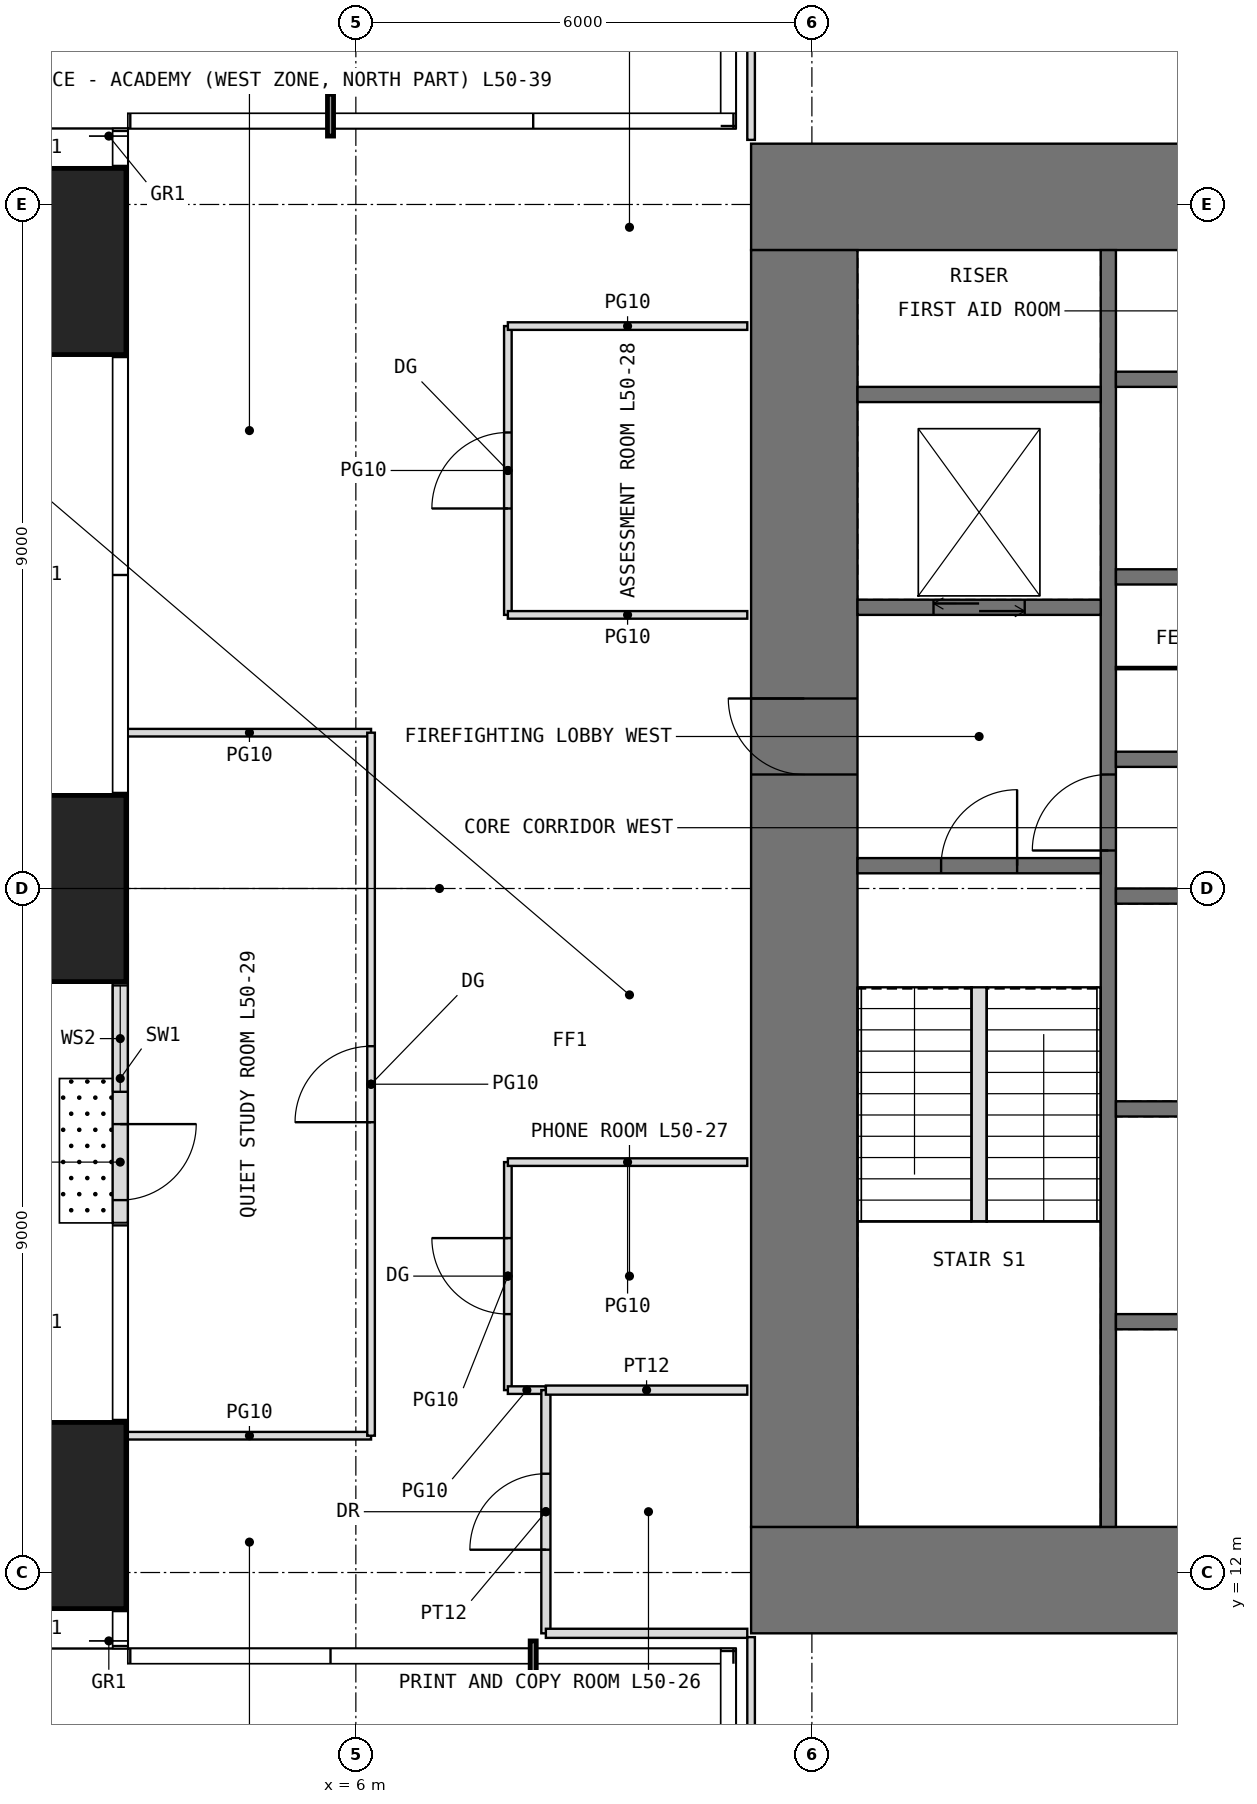
"""IFC4 building model, lengths in metres.
Left out: names, types, materials, properties, quantities, classifications, styles, units other than length and angle.
Written with IfcOpenShell. Run it as: python <this file> out.ifc"""

import sys

from ifc_helpers import new_model, si_unit, direction, frame, frame_2d, origin, origin_2d, place, context, subcontext, project, spatial, rectangle, extrude, element, fill, save


model = new_model("IFC4")
c1 = context("Model", 3, precision=1e-05, world=origin(), true_north=direction((0.0, 1.0)))
c2 = subcontext(c1, "Body", "Model", "MODEL_VIEW")
j1 = project(units=[si_unit("LENGTHUNIT", "METRE"), si_unit("PLANEANGLEUNIT", "RADIAN")], contexts=[c1])
p1 = place(None, origin())
s1 = spatial("IfcSite", under=j1, at=p1, CompositionType="ELEMENT")
p2 = place(p1, origin())
s2 = spatial("IfcBuilding", under=s1, at=p2, CompositionType="ELEMENT")
p3 = place(p2, frame((0.0, 0.0, 210.5)))
s3 = spatial("IfcBuildingStorey", under=s2, at=p3, CompositionType="ELEMENT", Elevation=210.5)
for number, where, z_axis, x_axis in (
    (1, (1.75, 12.75, 0.0), (0.0, 0.0, 1.0), (1.0, 0.0, 0.0)),
    (2, (1.75, 21.0, 0.0), (0.0, 0.0, 1.0), (1.0, 0.0, 0.0)),
    (3, (1.75, 29.25, 0.0), (0.0, 0.0, 1.0), (1.0, 0.0, 0.0)),
):
    element("IfcColumn", number, at=place(p3, frame(where, z_axis=z_axis, x_axis=x_axis)), inside=s3, PredefinedType="COLUMN", context=c2, shape_type="SweptSolid", body=[
        extrude(rectangle(XDim=2.45, YDim=2.45, at=origin_2d()), origin(), (0.0, 0.0, 1.0), 4.0),
    ])
p4 = place(p3, frame((2.9, 20.4, 0.0), z_axis=(0.0, 0.0, 1.0), x_axis=(0.0, -1.0, 0.0)))
e4 = element("IfcWall", 4, at=p4, inside=s3, PredefinedType="USERDEFINED", context=c2, shape_type="SweptSolid", body=[
    extrude(rectangle(XDim=3.8, YDim=0.2, at=frame_2d((1.9, 0.0))), origin(), (0.0, 0.0, 1.0), 3.75),
])
p5 = place(p4, frame((2.5, 0.0, 0.0)))
e5 = element("IfcOpeningElement", 5, at=p5, cuts=e4, PredefinedType="OPENING", context=c2, shape_type="SweptSolid", body=[
    extrude(rectangle(XDim=1.0, YDim=2.4, at=frame_2d((0.5, 1.2))), frame((0.0, 0.11, 0.0), z_axis=(0.0, -1.0, 0.0), x_axis=(1.0, 0.0, 0.0)), (0.0, 0.0, 1.0), 0.22),
])
p6 = place(p4, frame((0.675, 0.0, 0.3)))
e6 = element("IfcOpeningElement", 6, at=p6, cuts=e4, PredefinedType="OPENING", context=c2, shape_type="SweptSolid", body=[
    extrude(rectangle(XDim=1.4, YDim=2.7, at=frame_2d((0.7, 1.35))), frame((0.0, 0.11, 0.0), z_axis=(0.0, -1.0, 0.0), x_axis=(1.0, 0.0, 0.0)), (0.0, 0.0, 1.0), 0.22),
])
p7 = place(p3, frame((11.2, 11.9, -0.05), z_axis=(0.0, 0.0, 1.0), x_axis=(1.0, 0.0, 0.0)))
e7 = element("IfcWall", 7, at=p7, inside=s3, PredefinedType="SHEAR", context=c2, shape_type="SweptSolid", body=[
    extrude(rectangle(XDim=19.6, YDim=1.4, at=frame_2d((9.8, 0.0))), origin(), (0.0, 0.0, 1.0), 4.0),
])
p8 = place(p7, frame((8.8, 0.0, 0.05)))
e8 = element("IfcOpeningElement", 8, at=p8, cuts=e7, PredefinedType="OPENING", context=c2, shape_type="SweptSolid", body=[
    extrude(rectangle(XDim=2.0, YDim=2.2, at=frame_2d((1.0, 1.1))), frame((0.0, 0.71, 0.0), z_axis=(0.0, -1.0, 0.0), x_axis=(1.0, 0.0, 0.0)), (0.0, 0.0, 1.0), 1.42),
])
p9 = place(p3, frame((11.2, 30.1, -0.05), z_axis=(0.0, 0.0, 1.0), x_axis=(1.0, 0.0, 0.0)))
e9 = element("IfcWall", 9, at=p9, inside=s3, PredefinedType="SHEAR", context=c2, shape_type="SweptSolid", body=[
    extrude(rectangle(XDim=19.6, YDim=1.4, at=frame_2d((9.8, 0.0))), origin(), (0.0, 0.0, 1.0), 4.0),
])
p10 = place(p9, frame((8.8, 0.0, 0.05)))
e10 = element("IfcOpeningElement", 10, at=p10, cuts=e9, PredefinedType="OPENING", context=c2, shape_type="SweptSolid", body=[
    extrude(rectangle(XDim=2.0, YDim=2.2, at=frame_2d((1.0, 1.1))), frame((0.0, 0.71, 0.0), z_axis=(0.0, -1.0, 0.0), x_axis=(1.0, 0.0, 0.0)), (0.0, 0.0, 1.0), 1.42),
])
p11 = place(p3, frame((11.9, 12.6, -0.05), z_axis=(0.0, 0.0, 1.0), x_axis=(0.0, 1.0, 0.0)))
e11 = element("IfcWall", 11, at=p11, inside=s3, PredefinedType="SHEAR", context=c2, shape_type="SweptSolid", body=[
    extrude(rectangle(XDim=16.8, YDim=1.4, at=frame_2d((8.4, 0.0))), origin(), (0.0, 0.0, 1.0), 4.0),
])
p12 = place(p11, frame((9.9, 0.0, 0.05)))
e12 = element("IfcOpeningElement", 12, at=p12, cuts=e11, PredefinedType="OPENING", context=c2, shape_type="SweptSolid", body=[
    extrude(rectangle(XDim=1.0, YDim=2.2, at=frame_2d((0.5, 1.1))), frame((0.0, 0.71, 0.0), z_axis=(0.0, -1.0, 0.0), x_axis=(1.0, 0.0, 0.0)), (0.0, 0.0, 1.0), 1.42),
])
p13 = place(p3, frame((15.9, 12.6, -0.05), z_axis=(0.0, 0.0, 1.0), x_axis=(0.0, 1.0, 0.0)))
e13 = element("IfcWall", 13, at=p13, inside=s3, PredefinedType="SHEAR", context=c2, shape_type="SweptSolid", body=[
    extrude(rectangle(XDim=16.8, YDim=0.2, at=frame_2d((8.4, 0.0))), origin(), (0.0, 0.0, 1.0), 4.0),
])
p14 = place(p13, frame((8.9, 0.0, 0.05)))
e14 = element("IfcOpeningElement", 14, at=p14, cuts=e13, PredefinedType="OPENING", context=c2, shape_type="SweptSolid", body=[
    extrude(rectangle(XDim=1.0, YDim=2.2, at=frame_2d((0.5, 1.1))), frame((0.0, 0.11, 0.0), z_axis=(0.0, -1.0, 0.0), x_axis=(1.0, 0.0, 0.0)), (0.0, 0.0, 1.0), 0.22),
])
p15 = place(p3, frame((12.6, 21.3, -0.05), z_axis=(0.0, 0.0, 1.0), x_axis=(1.0, 0.0, 0.0)))
e15 = element("IfcWall", 15, at=p15, inside=s3, PredefinedType="SHEAR", context=c2, shape_type="SweptSolid", body=[
    extrude(rectangle(XDim=3.2, YDim=0.2, at=frame_2d((1.6, 0.0))), origin(), (0.0, 0.0, 1.0), 4.0),
])
p16 = place(p15, frame((1.1, 0.0, 0.05)))
e16 = element("IfcOpeningElement", 16, at=p16, cuts=e15, PredefinedType="OPENING", context=c2, shape_type="SweptSolid", body=[
    extrude(rectangle(XDim=1.0, YDim=2.2, at=frame_2d((0.5, 1.1))), frame((0.0, 0.11, 0.0), z_axis=(0.0, -1.0, 0.0), x_axis=(1.0, 0.0, 0.0)), (0.0, 0.0, 1.0), 0.22),
])
p17 = place(p3, frame((12.6, 24.7, -0.05), z_axis=(0.0, 0.0, 1.0), x_axis=(1.0, 0.0, 0.0)))
e17 = element("IfcWall", 17, at=p17, inside=s3, PredefinedType="SHEAR", context=c2, shape_type="SweptSolid", body=[
    extrude(rectangle(XDim=3.2, YDim=0.2, at=frame_2d((1.6, 0.0))), origin(), (0.0, 0.0, 1.0), 4.0),
])
p18 = place(p17, frame((1.0, 0.0, 0.05)))
e18 = element("IfcOpeningElement", 18, at=p18, cuts=e17, PredefinedType="OPENING", context=c2, shape_type="SweptSolid", body=[
    extrude(rectangle(XDim=1.2, YDim=2.2, at=frame_2d((0.6, 1.1))), frame((0.0, 0.11, 0.0), z_axis=(0.0, -1.0, 0.0), x_axis=(1.0, 0.0, 0.0)), (0.0, 0.0, 1.0), 0.22),
])
for number, where, z_axis, x_axis in (
    (19, (12.6, 27.5, -0.05), (0.0, 0.0, 1.0), (1.0, 0.0, 0.0)),
    (20, (16.0, 15.3, -0.05), (0.0, 0.0, 1.0), (1.0, 0.0, 0.0)),
    (21, (16.0, 18.1, -0.05), (0.0, 0.0, 1.0), (1.0, 0.0, 0.0)),
    (22, (16.0, 20.9, -0.05), (0.0, 0.0, 1.0), (1.0, 0.0, 0.0)),
    (23, (16.0, 22.7, -0.05), (0.0, 0.0, 1.0), (1.0, 0.0, 0.0)),
    (24, (16.0, 25.1, -0.05), (0.0, 0.0, 1.0), (1.0, 0.0, 0.0)),
    (25, (16.0, 27.7, -0.05), (0.0, 0.0, 1.0), (1.0, 0.0, 0.0)),
):
    element("IfcWall", number, at=place(p3, frame(where, z_axis=z_axis, x_axis=x_axis)), inside=s3, PredefinedType="SHEAR", context=c2, shape_type="SweptSolid", body=[
        extrude(rectangle(XDim=3.2, YDim=0.2, at=frame_2d((1.6, 0.0))), origin(), (0.0, 0.0, 1.0), 4.0),
    ])
p19 = place(p3, frame((16.0, 23.9, 0.0), z_axis=(0.0, 0.0, 1.0), x_axis=(1.0, 0.0, 0.0)))
e26 = element("IfcWall", 26, at=p19, inside=s3, PredefinedType="PARTITIONING", context=c2, shape_type="SweptSolid", body=[
    extrude(rectangle(XDim=1.4, YDim=0.03, at=frame_2d((0.7, 0.0))), origin(), (0.0, 0.0, 1.0), 3.75),
])
for number, where, z_axis, x_axis in (
    (27, (3.0, 13.8, 0.0), (0.0, 0.0, 1.0), (1.0, 0.0, 0.0)),
    (28, (3.0, 23.05, 0.0), (0.0, 0.0, 1.0), (1.0, 0.0, 0.0)),
):
    element("IfcWall", number, at=place(p3, frame(where, z_axis=z_axis, x_axis=x_axis)), inside=s3, PredefinedType="PARTITIONING", context=c2, shape_type="SweptSolid", body=[
        extrude(rectangle(XDim=3.2, YDim=0.1, at=frame_2d((1.6, 0.0))), origin(), (0.0, 0.0, 1.0), 3.75),
    ])
p20 = place(p3, frame((6.2, 13.8, 0.0), z_axis=(0.0, 0.0, 1.0), x_axis=(0.0, 1.0, 0.0)))
e29 = element("IfcWall", 29, at=p20, inside=s3, PredefinedType="PARTITIONING", context=c2, shape_type="SweptSolid", body=[
    extrude(rectangle(XDim=9.25, YDim=0.1, at=frame_2d((4.625, 0.0))), origin(), (0.0, 0.0, 1.0), 3.75),
])
p21 = place(p20, frame((4.125, 0.0, 0.0)))
e30 = element("IfcOpeningElement", 30, at=p21, cuts=e29, PredefinedType="OPENING", context=c2, shape_type="SweptSolid", body=[
    extrude(rectangle(XDim=1.0, YDim=2.4, at=frame_2d((0.5, 1.2))), frame((0.0, 0.06, 0.0), z_axis=(0.0, -1.0, 0.0), x_axis=(1.0, 0.0, 0.0)), (0.0, 0.0, 1.0), 0.12),
])
p22 = place(p3, frame((8.0, 14.4, 0.0), z_axis=(0.0, 0.0, 1.0), x_axis=(0.0, 1.0, 0.0)))
e31 = element("IfcWall", 31, at=p22, inside=s3, PredefinedType="PARTITIONING", context=c2, shape_type="SweptSolid", body=[
    extrude(rectangle(XDim=3.0, YDim=0.1, at=frame_2d((1.5, 0.0))), origin(), (0.0, 0.0, 1.0), 3.75),
])
p23 = place(p22, frame((1.0, 0.0, 0.0)))
e32 = element("IfcOpeningElement", 32, at=p23, cuts=e31, PredefinedType="OPENING", context=c2, shape_type="SweptSolid", body=[
    extrude(rectangle(XDim=1.0, YDim=2.4, at=frame_2d((0.5, 1.2))), frame((0.0, 0.06, 0.0), z_axis=(0.0, -1.0, 0.0), x_axis=(1.0, 0.0, 0.0)), (0.0, 0.0, 1.0), 0.12),
])
p24 = place(p3, frame((8.0, 14.4, 0.0), z_axis=(0.0, 0.0, 1.0), x_axis=(1.0, 0.0, 0.0)))
e33 = element("IfcWall", 33, at=p24, inside=s3, PredefinedType="PARTITIONING", context=c2, shape_type="SweptSolid", body=[
    extrude(rectangle(XDim=0.5, YDim=0.1, at=frame_2d((0.25, 0.0))), origin(), (0.0, 0.0, 1.0), 3.75),
])
p25 = place(p3, frame((8.0, 17.4, 0.0), z_axis=(0.0, 0.0, 1.0), x_axis=(1.0, 0.0, 0.0)))
e34 = element("IfcWall", 34, at=p25, inside=s3, PredefinedType="PARTITIONING", context=c2, shape_type="SweptSolid", body=[
    extrude(rectangle(XDim=3.15, YDim=0.1, at=frame_2d((1.575, 0.0))), origin(), (0.0, 0.0, 1.0), 3.75),
])
p26 = place(p3, frame((8.0, 24.6, 0.0), z_axis=(0.0, 0.0, 1.0), x_axis=(0.0, 1.0, 0.0)))
e35 = element("IfcWall", 35, at=p26, inside=s3, PredefinedType="PARTITIONING", context=c2, shape_type="SweptSolid", body=[
    extrude(rectangle(XDim=3.8, YDim=0.1, at=frame_2d((1.9, 0.0))), origin(), (0.0, 0.0, 1.0), 3.75),
])
p27 = place(p26, frame((1.4, 0.0, 0.0)))
e36 = element("IfcOpeningElement", 36, at=p27, cuts=e35, PredefinedType="OPENING", context=c2, shape_type="SweptSolid", body=[
    extrude(rectangle(XDim=1.0, YDim=2.4, at=frame_2d((0.5, 1.2))), frame((0.0, 0.06, 0.0), z_axis=(0.0, -1.0, 0.0), x_axis=(1.0, 0.0, 0.0)), (0.0, 0.0, 1.0), 0.12),
])
for number, where, z_axis, x_axis in (
    (37, (8.0, 24.6, 0.0), (0.0, 0.0, 1.0), (1.0, 0.0, 0.0)),
    (38, (8.0, 28.4, 0.0), (0.0, 0.0, 1.0), (1.0, 0.0, 0.0)),
):
    element("IfcWall", number, at=place(p3, frame(where, z_axis=z_axis, x_axis=x_axis)), inside=s3, PredefinedType="PARTITIONING", context=c2, shape_type="SweptSolid", body=[
        extrude(rectangle(XDim=3.15, YDim=0.1, at=frame_2d((1.575, 0.0))), origin(), (0.0, 0.0, 1.0), 3.75),
    ])
p28 = place(p3, frame((8.5, 11.2, 0.0), z_axis=(0.0, 0.0, 1.0), x_axis=(0.0, 1.0, 0.0)))
e39 = element("IfcWall", 39, at=p28, inside=s3, PredefinedType="PARTITIONING", context=c2, shape_type="SweptSolid", body=[
    extrude(rectangle(XDim=3.2, YDim=0.12, at=frame_2d((1.6, 0.0))), origin(), (0.0, 0.0, 1.0), 3.75),
])
p29 = place(p28, frame((1.1, 0.0, 0.0)))
e40 = element("IfcOpeningElement", 40, at=p29, cuts=e39, PredefinedType="OPENING", context=c2, shape_type="SweptSolid", body=[
    extrude(rectangle(XDim=1.0, YDim=2.2, at=frame_2d((0.5, 1.1))), frame((0.0, 0.07, 0.0), z_axis=(0.0, -1.0, 0.0), x_axis=(1.0, 0.0, 0.0)), (0.0, 0.0, 1.0), 0.14),
])
for number, where, z_axis, x_axis in (
    (41, (8.5, 11.2, 0.0), (0.0, 0.0, 1.0), (1.0, 0.0, 0.0)),
    (42, (8.5, 14.4, 0.0), (0.0, 0.0, 1.0), (1.0, 0.0, 0.0)),
):
    element("IfcWall", number, at=place(p3, frame(where, z_axis=z_axis, x_axis=x_axis)), inside=s3, PredefinedType="PARTITIONING", context=c2, shape_type="SweptSolid", body=[
        extrude(rectangle(XDim=2.65, YDim=0.12, at=frame_2d((1.325, 0.0))), origin(), (0.0, 0.0, 1.0), 3.75),
    ])
p30 = place(p3, frame((11.2, 5.6, 0.0), z_axis=(0.0, 0.0, 1.0), x_axis=(0.0, 1.0, 0.0)))
e43 = element("IfcWall", 43, at=p30, inside=s3, PredefinedType="PARTITIONING", context=c2, shape_type="SweptSolid", body=[
    extrude(rectangle(XDim=5.55, YDim=0.1, at=frame_2d((2.775, 0.0))), origin(), (0.0, 0.0, 1.0), 3.75),
])
p31 = place(p3, frame((11.2, 30.85, 0.0), z_axis=(0.0, 0.0, 1.0), x_axis=(0.0, 1.0, 0.0)))
e44 = element("IfcWall", 44, at=p31, inside=s3, PredefinedType="PARTITIONING", context=c2, shape_type="SweptSolid", body=[
    extrude(rectangle(XDim=4.95, YDim=0.1, at=frame_2d((2.475, 0.0))), origin(), (0.0, 0.0, 1.0), 3.75),
])
p32 = place(p3, frame((14.2, 16.62, 0.0), z_axis=(0.0, 0.0, 1.0), x_axis=(0.0, 1.0, 0.0)))
e45 = element("IfcWall", 45, at=p32, inside=s3, PredefinedType="PARTITIONING", context=c2, shape_type="SweptSolid", body=[
    extrude(rectangle(XDim=3.08, YDim=0.2, at=frame_2d((1.54, 0.0))), origin(), (0.0, 0.0, 1.0), 4.0),
])
p33 = place(p5, origin())
e46 = element("IfcDoor", 46, at=p33, inside=s3, OperationType="SINGLE_SWING_LEFT", PredefinedType="DOOR", context=c2, shape_type="SweptSolid", body=[
    extrude(rectangle(XDim=1.0, YDim=2.4, at=frame_2d((0.5, 1.2))), frame((0.0, 0.025, 0.0), z_axis=(0.0, -1.0, 0.0), x_axis=(1.0, 0.0, 0.0)), (0.0, 0.0, 1.0), 0.05),
])
fill(e5, e46)
p34 = place(p6, origin())
e47 = element("IfcWindow", 47, at=p34, inside=s3, PartitioningType="SINGLE_PANEL", PredefinedType="WINDOW", context=c2, shape_type="SweptSolid", body=[
    extrude(rectangle(XDim=1.4, YDim=2.7, at=frame_2d((0.7, 1.35))), frame((0.0, 0.03, 0.0), z_axis=(0.0, -1.0, 0.0), x_axis=(1.0, 0.0, 0.0)), (0.0, 0.0, 1.0), 0.06),
])
fill(e6, e47)
p35 = place(p12, origin())
e48 = element("IfcDoor", 48, at=p35, inside=s3, OperationType="SINGLE_SWING_RIGHT", PredefinedType="DOOR", context=c2, shape_type="SweptSolid", body=[
    extrude(rectangle(XDim=1.0, YDim=2.2, at=frame_2d((0.5, 1.1))), frame((0.0, 0.025, 0.0), z_axis=(0.0, -1.0, 0.0), x_axis=(1.0, 0.0, 0.0)), (0.0, 0.0, 1.0), 0.05),
])
fill(e12, e48)
p36 = place(p16, origin())
e49 = element("IfcDoor", 49, at=p36, inside=s3, OperationType="SINGLE_SWING_RIGHT", PredefinedType="DOOR", context=c2, shape_type="SweptSolid", body=[
    extrude(rectangle(XDim=1.0, YDim=2.2, at=frame_2d((0.5, 1.1))), frame((0.0, 0.025, 0.0), z_axis=(0.0, -1.0, 0.0), x_axis=(1.0, 0.0, 0.0)), (0.0, 0.0, 1.0), 0.05),
])
fill(e16, e49)
p37 = place(p14, origin())
e50 = element("IfcDoor", 50, at=p37, inside=s3, OperationType="SINGLE_SWING_LEFT", PredefinedType="DOOR", context=c2, shape_type="SweptSolid", body=[
    extrude(rectangle(XDim=1.0, YDim=2.2, at=frame_2d((0.5, 1.1))), frame((0.0, 0.025, 0.0), z_axis=(0.0, -1.0, 0.0), x_axis=(1.0, 0.0, 0.0)), (0.0, 0.0, 1.0), 0.05),
])
fill(e14, e50)
p38 = place(p29, origin())
e51 = element("IfcDoor", 51, at=p38, inside=s3, OperationType="SINGLE_SWING_LEFT", PredefinedType="DOOR", context=c2, shape_type="SweptSolid", body=[
    extrude(rectangle(XDim=1.0, YDim=2.2, at=frame_2d((0.5, 1.1))), frame((0.0, 0.025, 0.0), z_axis=(0.0, -1.0, 0.0), x_axis=(1.0, 0.0, 0.0)), (0.0, 0.0, 1.0), 0.05),
])
fill(e40, e51)
p39 = place(p23, origin())
e52 = element("IfcDoor", 52, at=p39, inside=s3, OperationType="SINGLE_SWING_RIGHT", PredefinedType="DOOR", context=c2, shape_type="SweptSolid", body=[
    extrude(rectangle(XDim=1.0, YDim=2.4, at=frame_2d((0.5, 1.2))), frame((0.0, 0.025, 0.0), z_axis=(0.0, -1.0, 0.0), x_axis=(1.0, 0.0, 0.0)), (0.0, 0.0, 1.0), 0.05),
])
fill(e32, e52)
p40 = place(p27, origin())
e53 = element("IfcDoor", 53, at=p40, inside=s3, OperationType="SINGLE_SWING_LEFT", PredefinedType="DOOR", context=c2, shape_type="SweptSolid", body=[
    extrude(rectangle(XDim=1.0, YDim=2.4, at=frame_2d((0.5, 1.2))), frame((0.0, 0.025, 0.0), z_axis=(0.0, -1.0, 0.0), x_axis=(1.0, 0.0, 0.0)), (0.0, 0.0, 1.0), 0.05),
])
fill(e36, e53)
p41 = place(p21, origin())
e54 = element("IfcDoor", 54, at=p41, inside=s3, OperationType="SINGLE_SWING_LEFT", PredefinedType="DOOR", context=c2, shape_type="SweptSolid", body=[
    extrude(rectangle(XDim=1.0, YDim=2.4, at=frame_2d((0.5, 1.2))), frame((0.0, 0.025, 0.0), z_axis=(0.0, -1.0, 0.0), x_axis=(1.0, 0.0, 0.0)), (0.0, 0.0, 1.0), 0.05),
])
fill(e30, e54)
p42 = place(p18, origin())
e55 = element("IfcDoor", 55, at=p42, inside=s3, OperationType="DOUBLE_DOOR_SLIDING", PredefinedType="DOOR", context=c2, shape_type="SweptSolid", body=[
    extrude(rectangle(XDim=1.2, YDim=2.2, at=frame_2d((0.6, 1.1))), frame((0.0, 0.025, 0.0), z_axis=(0.0, -1.0, 0.0), x_axis=(1.0, 0.0, 0.0)), (0.0, 0.0, 1.0), 0.05),
])
fill(e18, e55)
save(model, sys.argv[1])
